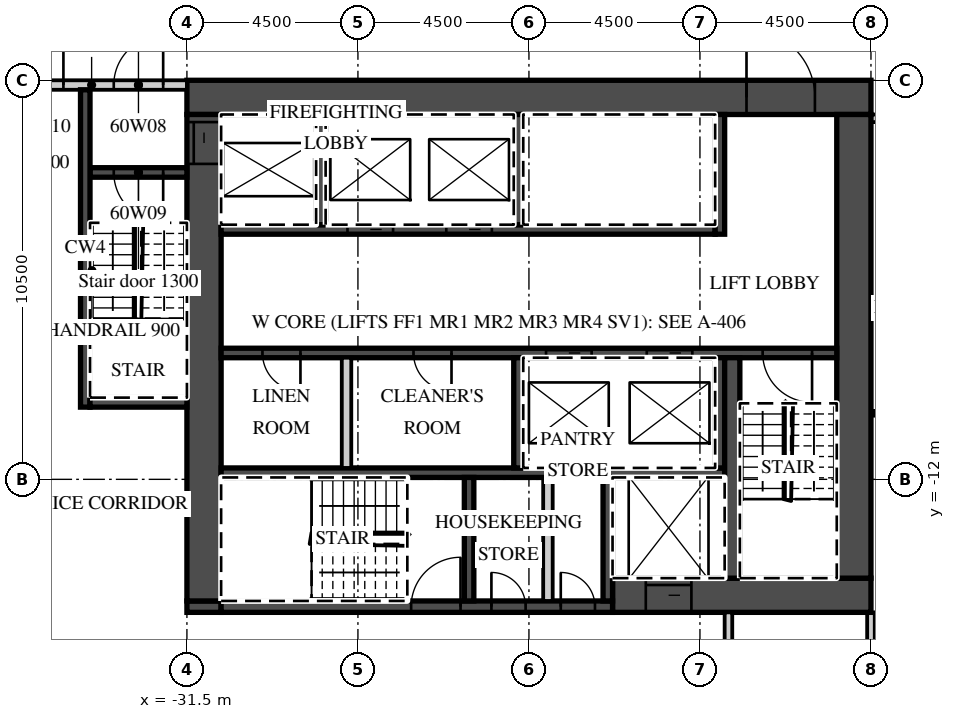
"""IFC4 building model, lengths in metres.
Left out: names, types, materials, properties, quantities, classifications, styles, units other than length and angle.
Written with IfcOpenShell. Run it as: python <this file> out.ifc"""

import sys

from ifc_helpers import new_model, si_unit, direction, frame, frame_2d, origin, place, context, subcontext, project, spatial, rectangle, extrude, element, fill, save


model = new_model("IFC4")
c1 = context("Model", 3, precision=1e-05, world=origin(), true_north=direction((0.0, 1.0)))
c2 = subcontext(c1, "Body", "Model", "MODEL_VIEW")
j1 = project(units=[si_unit("LENGTHUNIT", "METRE"), si_unit("PLANEANGLEUNIT", "RADIAN")], contexts=[c1])
p1 = place(None, origin())
s1 = spatial("IfcSite", under=j1, at=p1, CompositionType="ELEMENT")
p2 = place(p1, origin())
s2 = spatial("IfcBuilding", under=s1, at=p2, CompositionType="ELEMENT")
p3 = place(p2, frame((0.0, 0.0, 244.1)))
s3 = spatial("IfcBuildingStorey", under=s2, at=p3, CompositionType="ELEMENT", Elevation=244.1)
p4 = place(p3, frame((-13.5, -19.641, 0.0), z_axis=(0.0, 0.0, 1.0), x_axis=(0.0, 1.0, 0.0)))
e1 = element("IfcWall", 1, at=p4, inside=s3, PredefinedType="PARTITIONING", context=c2, shape_type="SweptSolid", body=[
    extrude(rectangle(XDim=4.141, YDim=0.2, at=frame_2d((2.071, 0.0))), origin(), (0.0, 0.0, 1.0), 3.02),
])
p5 = place(p3, frame((-13.5, -2.5, 0.0), z_axis=(0.0, 0.0, 1.0), x_axis=(1.0, 0.0, 0.0)))
e2 = element("IfcWall", 2, at=p5, inside=s3, PredefinedType="PARTITIONING", context=c2, shape_type="SweptSolid", body=[
    extrude(rectangle(XDim=27.0, YDim=0.2, at=frame_2d((13.5, 0.0))), origin(), (0.0, 0.0, 1.0), 3.02),
])
p6 = place(p5, frame((2.925, 0.0, 0.0)))
e3 = element("IfcOpeningElement", 3, at=p6, cuts=e2, PredefinedType="OPENING", context=c2, shape_type="SweptSolid", body=[
    extrude(rectangle(XDim=1.0, YDim=2.1, at=frame_2d((0.5, 1.05))), frame((0.0, 0.11, 0.0), z_axis=(0.0, -1.0, 0.0), x_axis=(1.0, 0.0, 0.0)), (0.0, 0.0, 1.0), 0.22),
])
p7 = place(p5, frame((5.075, 0.0, 0.0)))
e4 = element("IfcOpeningElement", 4, at=p7, cuts=e2, PredefinedType="OPENING", context=c2, shape_type="SweptSolid", body=[
    extrude(rectangle(XDim=1.0, YDim=2.1, at=frame_2d((0.5, 1.05))), frame((0.0, 0.11, 0.0), z_axis=(0.0, -1.0, 0.0), x_axis=(1.0, 0.0, 0.0)), (0.0, 0.0, 1.0), 0.22),
])
p8 = place(p5, frame((9.55, 0.0, 0.0)))
e5 = element("IfcOpeningElement", 5, at=p8, cuts=e2, PredefinedType="OPENING", context=c2, shape_type="SweptSolid", body=[
    extrude(rectangle(XDim=1.0, YDim=2.1, at=frame_2d((0.5, 1.05))), frame((0.0, 0.11, 0.0), z_axis=(0.0, -1.0, 0.0), x_axis=(1.0, 0.0, 0.0)), (0.0, 0.0, 1.0), 0.22),
])
p9 = place(p5, frame((14.075, 0.0, 0.0)))
e6 = element("IfcOpeningElement", 6, at=p9, cuts=e2, PredefinedType="OPENING", context=c2, shape_type="SweptSolid", body=[
    extrude(rectangle(XDim=1.0, YDim=2.1, at=frame_2d((0.5, 1.05))), frame((0.0, 0.11, 0.0), z_axis=(0.0, -1.0, 0.0), x_axis=(1.0, 0.0, 0.0)), (0.0, 0.0, 1.0), 0.22),
])
p10 = place(p5, frame((20.925, 0.0, 0.0)))
e7 = element("IfcOpeningElement", 7, at=p10, cuts=e2, PredefinedType="OPENING", context=c2, shape_type="SweptSolid", body=[
    extrude(rectangle(XDim=1.0, YDim=2.1, at=frame_2d((0.5, 1.05))), frame((0.0, 0.11, 0.0), z_axis=(0.0, -1.0, 0.0), x_axis=(1.0, 0.0, 0.0)), (0.0, 0.0, 1.0), 0.22),
])
p11 = place(p5, frame((23.075, 0.0, 0.0)))
e8 = element("IfcOpeningElement", 8, at=p11, cuts=e2, PredefinedType="OPENING", context=c2, shape_type="SweptSolid", body=[
    extrude(rectangle(XDim=1.0, YDim=2.1, at=frame_2d((0.5, 1.05))), frame((0.0, 0.11, 0.0), z_axis=(0.0, -1.0, 0.0), x_axis=(1.0, 0.0, 0.0)), (0.0, 0.0, 1.0), 0.22),
])
p12 = place(p3, frame((-31.5, -1.95, 0.0), z_axis=(0.0, 0.0, 1.0), x_axis=(1.0, 0.0, 0.0)))
e9 = element("IfcWall", 9, at=p12, inside=s3, PredefinedType="SHEAR", context=c2, shape_type="SweptSolid", body=[
    extrude(rectangle(XDim=18.0, YDim=0.9, at=frame_2d((9.0, 0.0))), origin(), (0.0, 0.0, 1.0), 3.02),
])
p13 = place(p12, frame((14.725, 0.0, 0.0)))
e10 = element("IfcOpeningElement", 10, at=p13, cuts=e9, PredefinedType="OPENING", context=c2, shape_type="SweptSolid", body=[
    extrude(rectangle(XDim=1.8, YDim=2.1, at=frame_2d((0.9, 1.05))), frame((0.0, 0.46, 0.0), z_axis=(0.0, -1.0, 0.0), x_axis=(1.0, 0.0, 0.0)), (0.0, 0.0, 1.0), 0.92),
])
p14 = place(p3, frame((-20.3, -15.05, 0.0), z_axis=(0.0, 0.0, 1.0), x_axis=(1.0, 0.0, 0.0)))
e11 = element("IfcWall", 11, at=p14, inside=s3, PredefinedType="SHEAR", context=c2, shape_type="SweptSolid", body=[
    extrude(rectangle(XDim=6.8, YDim=0.9, at=frame_2d((3.4, 0.0))), origin(), (0.0, 0.0, 1.0), 3.02),
])
p15 = place(p14, frame((0.875, 0.0, 0.0)))
e12 = element("IfcOpeningElement", 12, at=p15, cuts=e11, PredefinedType="OPENING", context=c2, shape_type="SweptSolid", body=[
    extrude(rectangle(XDim=1.2, YDim=2.1, at=frame_2d((0.6, 1.05))), frame((0.0, 0.46, 0.0), z_axis=(0.0, -1.0, 0.0), x_axis=(1.0, 0.0, 0.0)), (0.0, 0.0, 1.0), 0.92),
])
p16 = place(p3, frame((-31.5, -15.35, 0.0), z_axis=(0.0, 0.0, 1.0), x_axis=(1.0, 0.0, 0.0)))
e13 = element("IfcWall", 13, at=p16, inside=s3, PredefinedType="SHEAR", context=c2, shape_type="SweptSolid", body=[
    extrude(rectangle(XDim=0.9, YDim=0.3, at=frame_2d((0.45, 0.0))), origin(), (0.0, 0.0, 1.0), 3.02),
])
p17 = place(p3, frame((-30.6, -15.35, 0.0), z_axis=(0.0, 0.0, 1.0), x_axis=(1.0, 0.0, 0.0)))
e14 = element("IfcWall", 14, at=p17, inside=s3, PredefinedType="SHEAR", context=c2, shape_type="SweptSolid", body=[
    extrude(rectangle(XDim=10.3, YDim=0.3, at=frame_2d((5.15, 0.0))), origin(), (0.0, 0.0, 1.0), 3.02),
])
p18 = place(p17, frame((5.0, 0.0, 0.0)))
e15 = element("IfcOpeningElement", 15, at=p18, cuts=e14, PredefinedType="OPENING", context=c2, shape_type="SweptSolid", body=[
    extrude(rectangle(XDim=1.3, YDim=2.1, at=frame_2d((0.65, 1.05))), frame((0.0, 0.16, 0.0), z_axis=(0.0, -1.0, 0.0), x_axis=(1.0, 0.0, 0.0)), (0.0, 0.0, 1.0), 0.32),
])
p19 = place(p17, frame((7.113, 0.0, 0.0)))
e16 = element("IfcOpeningElement", 16, at=p19, cuts=e14, PredefinedType="OPENING", context=c2, shape_type="SweptSolid", body=[
    extrude(rectangle(XDim=0.9, YDim=2.1, at=frame_2d((0.45, 1.05))), frame((0.0, 0.16, 0.0), z_axis=(0.0, -1.0, 0.0), x_axis=(1.0, 0.0, 0.0)), (0.0, 0.0, 1.0), 0.32),
])
p20 = place(p17, frame((8.938, 0.0, 0.0)))
e17 = element("IfcOpeningElement", 17, at=p20, cuts=e14, PredefinedType="OPENING", context=c2, shape_type="SweptSolid", body=[
    extrude(rectangle(XDim=0.9, YDim=2.1, at=frame_2d((0.45, 1.05))), frame((0.0, 0.16, 0.0), z_axis=(0.0, -1.0, 0.0), x_axis=(1.0, 0.0, 0.0)), (0.0, 0.0, 1.0), 0.32),
])
p21 = place(p3, frame((-31.05, -15.2, 0.0), z_axis=(0.0, 0.0, 1.0), x_axis=(0.0, 1.0, 0.0)))
e18 = element("IfcWall", 18, at=p21, inside=s3, PredefinedType="SHEAR", context=c2, shape_type="SweptSolid", body=[
    extrude(rectangle(XDim=12.8, YDim=0.9, at=frame_2d((6.4, 0.0))), origin(), (0.0, 0.0, 1.0), 3.02),
])
p22 = place(p21, frame((11.5, 0.0, 0.0)))
e19 = element("IfcOpeningElement", 19, at=p22, cuts=e18, PredefinedType="OPENING", context=c2, shape_type="SweptSolid", body=[
    extrude(rectangle(XDim=1.1, YDim=2.1, at=frame_2d((0.55, 1.05))), frame((0.0, 0.46, 0.0), z_axis=(0.0, -1.0, 0.0), x_axis=(1.0, 0.0, 0.0)), (0.0, 0.0, 1.0), 0.92),
])
p23 = place(p3, frame((-13.95, -14.6, 0.0), z_axis=(0.0, 0.0, 1.0), x_axis=(0.0, 1.0, 0.0)))
e20 = element("IfcWall", 20, at=p23, inside=s3, PredefinedType="SHEAR", context=c2, shape_type="SweptSolid", body=[
    extrude(rectangle(XDim=12.2, YDim=0.9, at=frame_2d((6.1, 0.0))), origin(), (0.0, 0.0, 1.0), 3.02),
])
p24 = place(p3, frame((-30.6, -5.425, 0.0), z_axis=(0.0, 0.0, 1.0), x_axis=(1.0, 0.0, 0.0)))
e21 = element("IfcWall", 21, at=p24, inside=s3, PredefinedType="SHEAR", context=c2, shape_type="SweptSolid", body=[
    extrude(rectangle(XDim=13.0, YDim=0.25, at=frame_2d((6.5, 0.0))), origin(), (0.0, 0.0, 1.0), 3.02),
])
p25 = place(p24, frame((3.325, 0.0, 0.0)))
e22 = element("IfcOpeningElement", 22, at=p25, cuts=e21, PredefinedType="OPENING", context=c2, shape_type="SweptSolid", body=[
    extrude(rectangle(XDim=1.2, YDim=2.1, at=frame_2d((0.6, 1.05))), frame((0.0, 0.135, 0.0), z_axis=(0.0, -1.0, 0.0), x_axis=(1.0, 0.0, 0.0)), (0.0, 0.0, 1.0), 0.27),
])
p26 = place(p24, frame((5.925, 0.0, 0.0)))
e23 = element("IfcOpeningElement", 23, at=p26, cuts=e21, PredefinedType="OPENING", context=c2, shape_type="SweptSolid", body=[
    extrude(rectangle(XDim=1.2, YDim=2.1, at=frame_2d((0.6, 1.05))), frame((0.0, 0.135, 0.0), z_axis=(0.0, -1.0, 0.0), x_axis=(1.0, 0.0, 0.0)), (0.0, 0.0, 1.0), 0.27),
])
p27 = place(p3, frame((-17.475, -5.55, 0.0), z_axis=(0.0, 0.0, 1.0), x_axis=(0.0, 1.0, 0.0)))
e24 = element("IfcWall", 24, at=p27, inside=s3, PredefinedType="SHEAR", context=c2, shape_type="SweptSolid", body=[
    extrude(rectangle(XDim=3.15, YDim=0.25, at=frame_2d((1.575, 0.0))), origin(), (0.0, 0.0, 1.0), 3.02),
])
for number, where, z_axis, x_axis in (
    (25, (-27.975, -5.3, 0.0), (0.0, 0.0, 1.0), (0.0, 1.0, 0.0)),
    (26, (-22.775, -5.3, 0.0), (0.0, 0.0, 1.0), (0.0, 1.0, 0.0)),
):
    element("IfcWall", number, at=place(p3, frame(where, z_axis=z_axis, x_axis=x_axis)), inside=s3, PredefinedType="SHEAR", context=c2, shape_type="SweptSolid", body=[
        extrude(rectangle(XDim=2.9, YDim=0.25, at=frame_2d((1.45, 0.0))), origin(), (0.0, 0.0, 1.0), 3.02),
    ])
p28 = place(p3, frame((-30.6, -8.675, 0.0), z_axis=(0.0, 0.0, 1.0), x_axis=(1.0, 0.0, 0.0)))
e27 = element("IfcWall", 27, at=p28, inside=s3, PredefinedType="SHEAR", context=c2, shape_type="SweptSolid", body=[
    extrude(rectangle(XDim=16.2, YDim=0.25, at=frame_2d((8.1, 0.0))), origin(), (0.0, 0.0, 1.0), 3.02),
])
p29 = place(p28, frame((8.55, 0.0, 0.0)))
e28 = element("IfcOpeningElement", 28, at=p29, cuts=e27, PredefinedType="OPENING", context=c2, shape_type="SweptSolid", body=[
    extrude(rectangle(XDim=1.2, YDim=2.1, at=frame_2d((0.6, 1.05))), frame((0.0, 0.135, 0.0), z_axis=(0.0, -1.0, 0.0), x_axis=(1.0, 0.0, 0.0)), (0.0, 0.0, 1.0), 0.27),
])
p30 = place(p28, frame((11.2, 0.0, 0.0)))
e29 = element("IfcOpeningElement", 29, at=p30, cuts=e27, PredefinedType="OPENING", context=c2, shape_type="SweptSolid", body=[
    extrude(rectangle(XDim=1.2, YDim=2.1, at=frame_2d((0.6, 1.05))), frame((0.0, 0.135, 0.0), z_axis=(0.0, -1.0, 0.0), x_axis=(1.0, 0.0, 0.0)), (0.0, 0.0, 1.0), 0.27),
])
p31 = place(p28, frame((14.25, 0.0, 0.0)))
e30 = element("IfcOpeningElement", 30, at=p31, cuts=e27, PredefinedType="OPENING", context=c2, shape_type="SweptSolid", body=[
    extrude(rectangle(XDim=1.3, YDim=2.1, at=frame_2d((0.65, 1.05))), frame((0.0, 0.135, 0.0), z_axis=(0.0, -1.0, 0.0), x_axis=(1.0, 0.0, 0.0)), (0.0, 0.0, 1.0), 0.27),
])
p32 = place(p28, frame((1.087, 0.0, 0.0)))
e31 = element("IfcOpeningElement", 31, at=p32, cuts=e27, PredefinedType="OPENING", context=c2, shape_type="SweptSolid", body=[
    extrude(rectangle(XDim=1.0, YDim=2.1, at=frame_2d((0.5, 1.05))), frame((0.0, 0.135, 0.0), z_axis=(0.0, -1.0, 0.0), x_axis=(1.0, 0.0, 0.0)), (0.0, 0.0, 1.0), 0.27),
])
p33 = place(p28, frame((5.062, 0.0, 0.0)))
e32 = element("IfcOpeningElement", 32, at=p33, cuts=e27, PredefinedType="OPENING", context=c2, shape_type="SweptSolid", body=[
    extrude(rectangle(XDim=1.0, YDim=2.1, at=frame_2d((0.5, 1.05))), frame((0.0, 0.135, 0.0), z_axis=(0.0, -1.0, 0.0), x_axis=(1.0, 0.0, 0.0)), (0.0, 0.0, 1.0), 0.27),
])
p34 = place(p3, frame((-30.6, -11.825, 0.0), z_axis=(0.0, 0.0, 1.0), x_axis=(1.0, 0.0, 0.0)))
e33 = element("IfcWall", 33, at=p34, inside=s3, PredefinedType="SHEAR", context=c2, shape_type="SweptSolid", body=[
    extrude(rectangle(XDim=13.25, YDim=0.25, at=frame_2d((6.625, 0.0))), origin(), (0.0, 0.0, 1.0), 3.02),
])
for number, where, z_axis, x_axis in (
    (34, (-17.475, -11.7, 0.0), (0.0, 0.0, 1.0), (0.0, 1.0, 0.0)),
    (35, (-22.775, -11.7, 0.0), (0.0, 0.0, 1.0), (0.0, 1.0, 0.0)),
):
    element("IfcWall", number, at=place(p3, frame(where, z_axis=z_axis, x_axis=x_axis)), inside=s3, PredefinedType="SHEAR", context=c2, shape_type="SweptSolid", body=[
        extrude(rectangle(XDim=2.9, YDim=0.25, at=frame_2d((1.45, 0.0))), origin(), (0.0, 0.0, 1.0), 3.02),
    ])
p35 = place(p3, frame((-27.3, -11.7, 0.0), z_axis=(0.0, 0.0, 1.0), x_axis=(0.0, 1.0, 0.0)))
e36 = element("IfcWall", 36, at=p35, inside=s3, PredefinedType="PARTITIONING", context=c2, shape_type="SweptSolid", body=[
    extrude(rectangle(XDim=2.9, YDim=0.25, at=frame_2d((1.45, 0.0))), origin(), (0.0, 0.0, 1.0), 3.02),
])
p36 = place(p3, frame((-17.15, -14.6, 0.0), z_axis=(0.0, 0.0, 1.0), x_axis=(0.0, 1.0, 0.0)))
e37 = element("IfcWall", 37, at=p36, inside=s3, PredefinedType="SHEAR", context=c2, shape_type="SweptSolid", body=[
    extrude(rectangle(XDim=5.8, YDim=0.4, at=frame_2d((2.9, 0.0))), origin(), (0.0, 0.0, 1.0), 3.02),
])
for number, where, z_axis, x_axis in (
    (38, (-20.425, -15.2, 0.0), (0.0, 0.0, 1.0), (0.0, 1.0, 0.0)),
    (39, (-24.075, -15.2, 0.0), (0.0, 0.0, 1.0), (0.0, 1.0, 0.0)),
):
    element("IfcWall", number, at=place(p3, frame(where, z_axis=z_axis, x_axis=x_axis)), inside=s3, PredefinedType="SHEAR", context=c2, shape_type="SweptSolid", body=[
        extrude(rectangle(XDim=3.25, YDim=0.25, at=frame_2d((1.625, 0.0))), origin(), (0.0, 0.0, 1.0), 3.02),
    ])
p37 = place(p3, frame((-22.0, -15.2, 0.0), z_axis=(0.0, 0.0, 1.0), x_axis=(0.0, 1.0, 0.0)))
e40 = element("IfcWall", 40, at=p37, inside=s3, PredefinedType="PARTITIONING", context=c2, shape_type="SweptSolid", body=[
    extrude(rectangle(XDim=3.25, YDim=0.25, at=frame_2d((1.625, 0.0))), origin(), (0.0, 0.0, 1.0), 3.02),
])
p38 = place(p3, frame((-36.515, -1.625, 0.0), z_axis=(0.0, 0.0, 1.0), x_axis=(1.0, 0.0, 0.0)))
e41 = element("IfcWall", 41, at=p38, inside=s3, PredefinedType="PARTITIONING", context=c2, shape_type="SweptSolid", body=[
    extrude(rectangle(XDim=5.015, YDim=0.25, at=frame_2d((2.508, 0.0))), origin(), (0.0, 0.0, 1.0), 3.02),
])
p39 = place(p38, frame((3.09, 0.0, 0.0)))
e42 = element("IfcOpeningElement", 42, at=p39, cuts=e41, PredefinedType="OPENING", context=c2, shape_type="SweptSolid", body=[
    extrude(rectangle(XDim=1.3, YDim=2.1, at=frame_2d((0.65, 1.05))), frame((0.0, 0.135, 0.0), z_axis=(0.0, -1.0, 0.0), x_axis=(1.0, 0.0, 0.0)), (0.0, 0.0, 1.0), 0.27),
])
p40 = place(p38, frame((0.665, 0.0, 0.0)))
e43 = element("IfcOpeningElement", 43, at=p40, cuts=e41, PredefinedType="OPENING", context=c2, shape_type="SweptSolid", body=[
    extrude(rectangle(XDim=1.1, YDim=2.1, at=frame_2d((0.55, 1.05))), frame((0.0, 0.135, 0.0), z_axis=(0.0, -1.0, 0.0), x_axis=(1.0, 0.0, 0.0)), (0.0, 0.0, 1.0), 0.27),
])
p41 = place(p3, frame((-34.05, -3.925, 0.0), z_axis=(0.0, 0.0, 1.0), x_axis=(1.0, 0.0, 0.0)))
e44 = element("IfcWall", 44, at=p41, inside=s3, PredefinedType="SHEAR", context=c2, shape_type="SweptSolid", body=[
    extrude(rectangle(XDim=2.55, YDim=0.25, at=frame_2d((1.275, 0.0))), origin(), (0.0, 0.0, 1.0), 3.02),
])
p42 = place(p41, frame((0.625, 0.0, 0.0)))
e45 = element("IfcOpeningElement", 45, at=p42, cuts=e44, PredefinedType="OPENING", context=c2, shape_type="SweptSolid", body=[
    extrude(rectangle(XDim=1.3, YDim=2.1, at=frame_2d((0.65, 1.05))), frame((0.0, 0.135, 0.0), z_axis=(0.0, -1.0, 0.0), x_axis=(1.0, 0.0, 0.0)), (0.0, 0.0, 1.0), 0.27),
])
p43 = place(p3, frame((-34.175, -10.1, 0.0), z_axis=(0.0, 0.0, 1.0), x_axis=(0.0, 1.0, 0.0)))
e46 = element("IfcWall", 46, at=p43, inside=s3, PredefinedType="SHEAR", context=c2, shape_type="SweptSolid", body=[
    extrude(rectangle(XDim=8.35, YDim=0.25, at=frame_2d((4.175, 0.0))), origin(), (0.0, 0.0, 1.0), 3.02),
])
p44 = place(p3, frame((-34.05, -9.975, 0.0), z_axis=(0.0, 0.0, 1.0), x_axis=(1.0, 0.0, 0.0)))
e47 = element("IfcWall", 47, at=p44, inside=s3, PredefinedType="SHEAR", context=c2, shape_type="SweptSolid", body=[
    extrude(rectangle(XDim=2.55, YDim=0.25, at=frame_2d((1.275, 0.0))), origin(), (0.0, 0.0, 1.0), 3.02),
])
p45 = place(p3, frame((-17.25, -17.7, 0.0), z_axis=(0.0, 0.0, 1.0), x_axis=(0.0, 1.0, 0.0)))
e48 = element("IfcWall", 48, at=p45, inside=s3, PredefinedType="PARTITIONING", context=c2, shape_type="SweptSolid", body=[
    extrude(rectangle(XDim=2.2, YDim=0.2, at=frame_2d((1.1, 0.0))), origin(), (0.0, 0.0, 1.0), 3.02),
])
p46 = place(p29, origin())
e49 = element("IfcDoor", 49, at=p46, inside=s3, OperationType="SLIDING_TO_LEFT", PredefinedType="DOOR", context=c2, shape_type="SweptSolid", body=[
    extrude(rectangle(XDim=1.2, YDim=2.1, at=frame_2d((0.6, 1.05))), frame((0.0, 0.025, 0.0), z_axis=(0.0, -1.0, 0.0), x_axis=(1.0, 0.0, 0.0)), (0.0, 0.0, 1.0), 0.05),
])
fill(e28, e49)
p47 = place(p30, origin())
e50 = element("IfcDoor", 50, at=p47, inside=s3, OperationType="SLIDING_TO_RIGHT", PredefinedType="DOOR", context=c2, shape_type="SweptSolid", body=[
    extrude(rectangle(XDim=1.2, YDim=2.1, at=frame_2d((0.6, 1.05))), frame((0.0, 0.025, 0.0), z_axis=(0.0, -1.0, 0.0), x_axis=(1.0, 0.0, 0.0)), (0.0, 0.0, 1.0), 0.05),
])
fill(e29, e50)
p48 = place(p25, origin())
e51 = element("IfcDoor", 51, at=p48, inside=s3, OperationType="SLIDING_TO_RIGHT", PredefinedType="DOOR", context=c2, shape_type="SweptSolid", body=[
    extrude(rectangle(XDim=1.2, YDim=2.1, at=frame_2d((0.6, 1.05))), frame((0.0, 0.025, 0.0), z_axis=(0.0, -1.0, 0.0), x_axis=(1.0, 0.0, 0.0)), (0.0, 0.0, 1.0), 0.05),
])
fill(e22, e51)
p49 = place(p26, origin())
e52 = element("IfcDoor", 52, at=p49, inside=s3, OperationType="SLIDING_TO_RIGHT", PredefinedType="DOOR", context=c2, shape_type="SweptSolid", body=[
    extrude(rectangle(XDim=1.2, YDim=2.1, at=frame_2d((0.6, 1.05))), frame((0.0, 0.025, 0.0), z_axis=(0.0, -1.0, 0.0), x_axis=(1.0, 0.0, 0.0)), (0.0, 0.0, 1.0), 0.05),
])
fill(e23, e52)
p50 = place(p15, origin())
e53 = element("IfcDoor", 53, at=p50, inside=s3, OperationType="SLIDING_TO_LEFT", PredefinedType="DOOR", context=c2, shape_type="SweptSolid", body=[
    extrude(rectangle(XDim=1.2, YDim=2.1, at=frame_2d((0.6, 1.05))), frame((0.0, 0.025, 0.0), z_axis=(0.0, -1.0, 0.0), x_axis=(1.0, 0.0, 0.0)), (0.0, 0.0, 1.0), 0.05),
])
fill(e12, e53)
p51 = place(p22, origin())
e54 = element("IfcDoor", 54, at=p51, inside=s3, OperationType="SLIDING_TO_RIGHT", PredefinedType="DOOR", context=c2, shape_type="SweptSolid", body=[
    extrude(rectangle(XDim=1.1, YDim=2.1, at=frame_2d((0.55, 1.05))), frame((0.0, 0.025, 0.0), z_axis=(0.0, -1.0, 0.0), x_axis=(1.0, 0.0, 0.0)), (0.0, 0.0, 1.0), 0.05),
])
fill(e19, e54)
p52 = place(p13, origin())
e55 = element("IfcDoor", 55, at=p52, inside=s3, OperationType="DOUBLE_DOOR_DOUBLE_SWING", PredefinedType="DOOR", context=c2, shape_type="SweptSolid", body=[
    extrude(rectangle(XDim=1.8, YDim=2.1, at=frame_2d((0.9, 1.05))), frame((0.0, 0.025, 0.0), z_axis=(0.0, -1.0, 0.0), x_axis=(1.0, 0.0, 0.0)), (0.0, 0.0, 1.0), 0.05),
])
fill(e10, e55)
p53 = place(p39, origin())
e56 = element("IfcDoor", 56, at=p53, inside=s3, OperationType="SINGLE_SWING_RIGHT", PredefinedType="DOOR", context=c2, shape_type="SweptSolid", body=[
    extrude(rectangle(XDim=1.3, YDim=2.1, at=frame_2d((0.65, 1.05))), frame((0.0, 0.025, 0.0), z_axis=(0.0, -1.0, 0.0), x_axis=(1.0, 0.0, 0.0)), (0.0, 0.0, 1.0), 0.05),
])
fill(e42, e56)
p54 = place(p42, origin())
e57 = element("IfcDoor", 57, at=p54, inside=s3, OperationType="SINGLE_SWING_RIGHT", PredefinedType="DOOR", context=c2, shape_type="SweptSolid", body=[
    extrude(rectangle(XDim=1.3, YDim=2.1, at=frame_2d((0.65, 1.05))), frame((0.0, 0.025, 0.0), z_axis=(0.0, -1.0, 0.0), x_axis=(1.0, 0.0, 0.0)), (0.0, 0.0, 1.0), 0.05),
])
fill(e45, e57)
p55 = place(p40, origin())
e58 = element("IfcDoor", 58, at=p55, inside=s3, OperationType="SINGLE_SWING_RIGHT", PredefinedType="DOOR", context=c2, shape_type="SweptSolid", body=[
    extrude(rectangle(XDim=1.1, YDim=2.1, at=frame_2d((0.55, 1.05))), frame((0.0, 0.025, 0.0), z_axis=(0.0, -1.0, 0.0), x_axis=(1.0, 0.0, 0.0)), (0.0, 0.0, 1.0), 0.05),
])
fill(e43, e58)
p56 = place(p31, origin())
e59 = element("IfcDoor", 59, at=p56, inside=s3, OperationType="SINGLE_SWING_RIGHT", PredefinedType="DOOR", context=c2, shape_type="SweptSolid", body=[
    extrude(rectangle(XDim=1.3, YDim=2.1, at=frame_2d((0.65, 1.05))), frame((0.0, 0.025, 0.0), z_axis=(0.0, -1.0, 0.0), x_axis=(1.0, 0.0, 0.0)), (0.0, 0.0, 1.0), 0.05),
])
fill(e30, e59)
p57 = place(p18, origin())
e60 = element("IfcDoor", 60, at=p57, inside=s3, OperationType="SINGLE_SWING_RIGHT", PredefinedType="DOOR", context=c2, shape_type="SweptSolid", body=[
    extrude(rectangle(XDim=1.3, YDim=2.1, at=frame_2d((0.65, 1.05))), frame((0.0, 0.025, 0.0), z_axis=(0.0, -1.0, 0.0), x_axis=(1.0, 0.0, 0.0)), (0.0, 0.0, 1.0), 0.05),
])
fill(e15, e60)
p58 = place(p19, origin())
e61 = element("IfcDoor", 61, at=p58, inside=s3, OperationType="SINGLE_SWING_LEFT", PredefinedType="DOOR", context=c2, shape_type="SweptSolid", body=[
    extrude(rectangle(XDim=0.9, YDim=2.1, at=frame_2d((0.45, 1.05))), frame((0.0, 0.025, 0.0), z_axis=(0.0, -1.0, 0.0), x_axis=(1.0, 0.0, 0.0)), (0.0, 0.0, 1.0), 0.05),
])
fill(e16, e61)
p59 = place(p20, origin())
e62 = element("IfcDoor", 62, at=p59, inside=s3, OperationType="SINGLE_SWING_LEFT", PredefinedType="DOOR", context=c2, shape_type="SweptSolid", body=[
    extrude(rectangle(XDim=0.9, YDim=2.1, at=frame_2d((0.45, 1.05))), frame((0.0, 0.025, 0.0), z_axis=(0.0, -1.0, 0.0), x_axis=(1.0, 0.0, 0.0)), (0.0, 0.0, 1.0), 0.05),
])
fill(e17, e62)
p60 = place(p32, origin())
e63 = element("IfcDoor", 63, at=p60, inside=s3, OperationType="SINGLE_SWING_RIGHT", PredefinedType="DOOR", context=c2, shape_type="SweptSolid", body=[
    extrude(rectangle(XDim=1.0, YDim=2.1, at=frame_2d((0.5, 1.05))), frame((0.0, 0.025, 0.0), z_axis=(0.0, -1.0, 0.0), x_axis=(1.0, 0.0, 0.0)), (0.0, 0.0, 1.0), 0.05),
])
fill(e31, e63)
p61 = place(p33, origin())
e64 = element("IfcDoor", 64, at=p61, inside=s3, OperationType="SINGLE_SWING_RIGHT", PredefinedType="DOOR", context=c2, shape_type="SweptSolid", body=[
    extrude(rectangle(XDim=1.0, YDim=2.1, at=frame_2d((0.5, 1.05))), frame((0.0, 0.025, 0.0), z_axis=(0.0, -1.0, 0.0), x_axis=(1.0, 0.0, 0.0)), (0.0, 0.0, 1.0), 0.05),
])
fill(e32, e64)
save(model, sys.argv[1])
